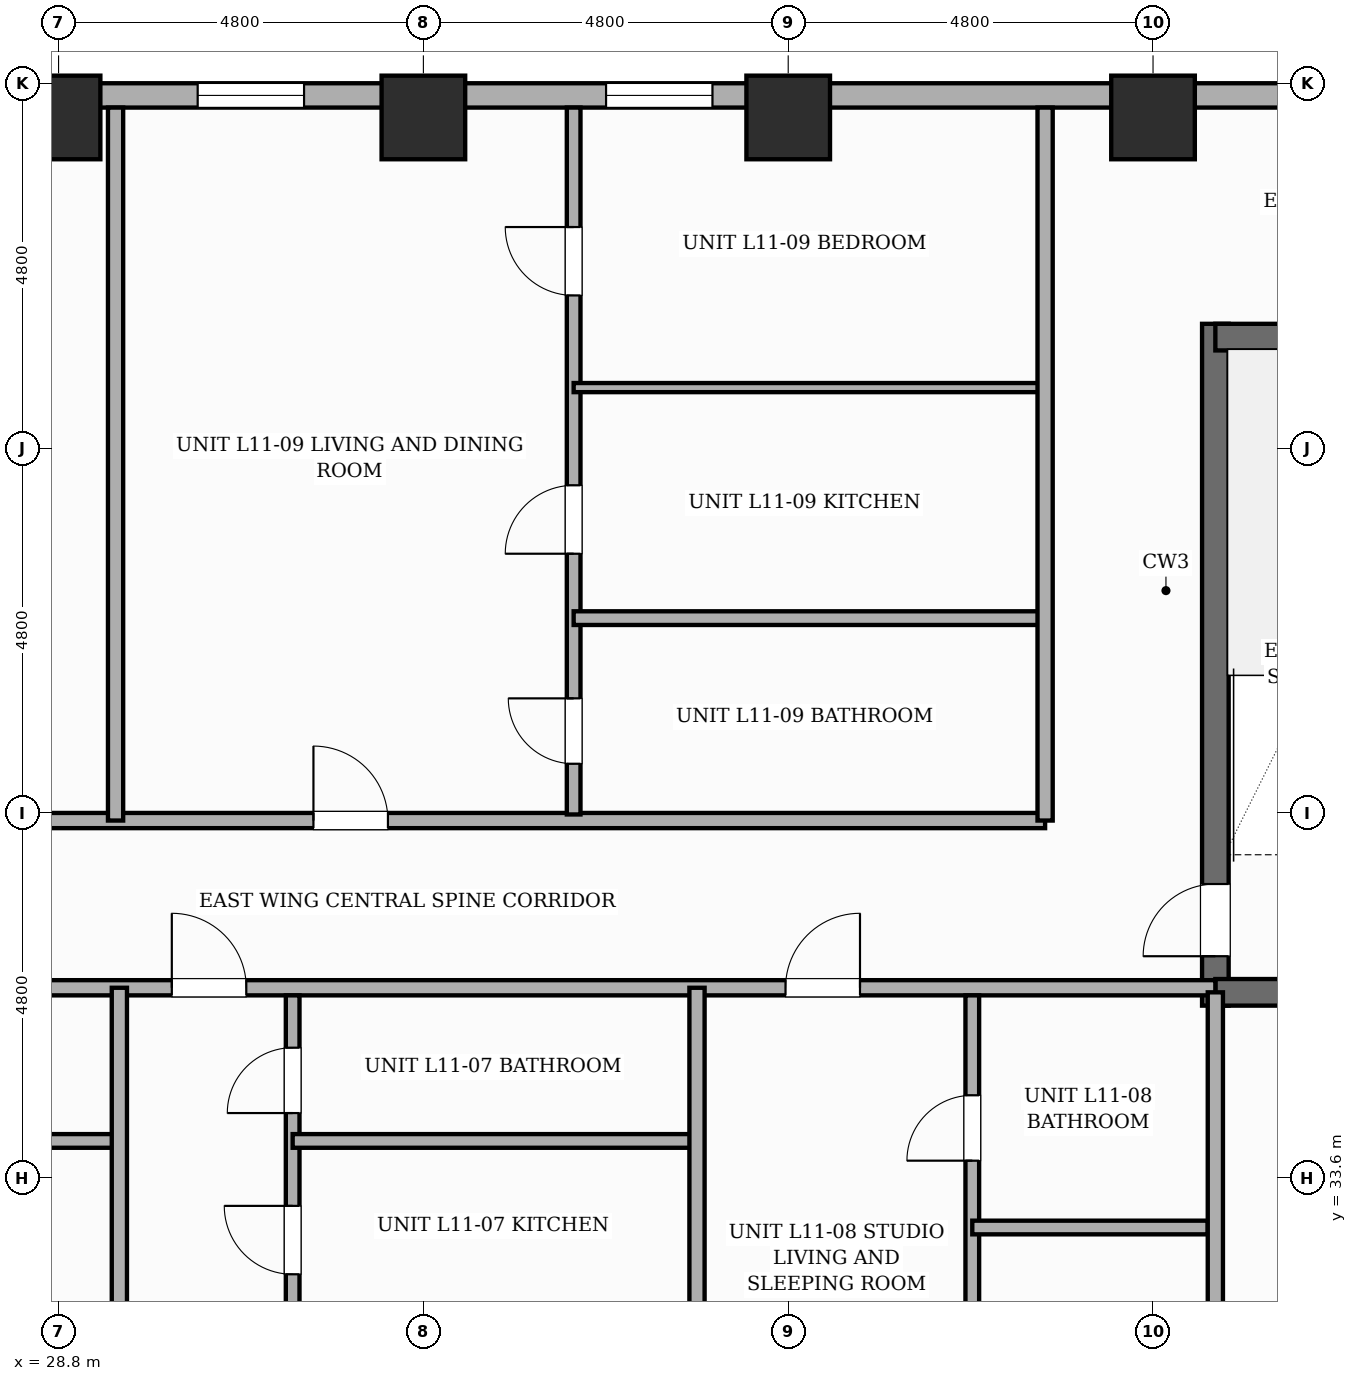
"""IFC4 building model, lengths in metres.
Left out: names, types, materials, properties, quantities, classifications, styles, units other than length and angle.
Written with IfcOpenShell. Run it as: python <this file> out.ifc"""

import sys

from ifc_helpers import new_model, si_unit, direction, frame, frame_2d, origin, origin_2d, place, context, subcontext, project, spatial, rectangle, extrude, element, fill, save


model = new_model("IFC4")
c1 = context("Model", 3, precision=1e-05, world=origin(), true_north=direction((0.0, 1.0)))
c2 = subcontext(c1, "Body", "Model", "MODEL_VIEW")
j1 = project(units=[si_unit("LENGTHUNIT", "METRE"), si_unit("PLANEANGLEUNIT", "RADIAN")], contexts=[c1])
p1 = place(None, origin())
s1 = spatial("IfcSite", under=j1, at=p1, CompositionType="ELEMENT")
p2 = place(p1, origin())
s2 = spatial("IfcBuilding", under=s1, at=p2, CompositionType="ELEMENT")
p3 = place(p2, frame((0.0, 0.0, 46.6)))
s3 = spatial("IfcBuildingStorey", under=s2, at=p3, CompositionType="ELEMENT", Elevation=46.6)
p4 = place(p3, frame((44.02, 35.865, 0.0), z_axis=(0.0, 0.0, 1.0), x_axis=(0.0, 1.0, 0.0)))
e1 = element("IfcWall", 1, at=p4, inside=s3, PredefinedType="SHEAR", context=c2, shape_type="SweptSolid", body=[
    extrude(rectangle(XDim=8.97, YDim=0.35, at=frame_2d((4.485, 0.0))), origin(), (0.0, 0.0, 1.0), 3.6),
])
p5 = place(p4, frame((0.65, 0.0, 0.0)))
e2 = element("IfcOpeningElement", 2, at=p5, cuts=e1, PredefinedType="OPENING", context=c2, shape_type="SweptSolid", body=[
    extrude(rectangle(XDim=0.95, YDim=2.1, at=frame_2d((0.475, 1.05))), frame((0.0, 0.185, 0.0), z_axis=(0.0, -1.0, 0.0), x_axis=(1.0, 0.0, 0.0)), (0.0, 0.0, 1.0), 0.37),
])
for number, where, z_axis, x_axis in (
    (3, (44.02, 36.04, 0.0), (0.0, 0.0, 1.0), (1.0, 0.0, 0.0)),
    (4, (44.02, 44.66, 0.0), (0.0, 0.0, 1.0), (1.0, 0.0, 0.0)),
):
    element("IfcWall", number, at=place(p3, frame(where, z_axis=z_axis, x_axis=x_axis)), inside=s3, PredefinedType="SHEAR", context=c2, shape_type="SweptSolid", body=[
        extrude(rectangle(XDim=3.58, YDim=0.35, at=frame_2d((1.79, 0.0))), origin(), (0.0, 0.0, 1.0), 3.6),
    ])
for number, where, z_axis, x_axis in (
    (5, (28.8, 47.55, 0.0), (0.0, 0.0, 1.0), (1.0, 0.0, 0.0)),
    (6, (33.6, 47.55, 0.0), (0.0, 0.0, 1.0), (1.0, 0.0, 0.0)),
    (7, (38.4, 47.55, 0.0), (0.0, 0.0, 1.0), (1.0, 0.0, 0.0)),
    (8, (43.2, 47.55, 0.0), (0.0, 0.0, 1.0), (1.0, 0.0, 0.0)),
):
    element("IfcColumn", number, at=place(p3, frame(where, z_axis=z_axis, x_axis=x_axis)), inside=s3, PredefinedType="COLUMN", context=c2, shape_type="SweptSolid", body=[
        extrude(rectangle(XDim=1.1, YDim=1.1, at=origin_2d()), origin(), (0.0, 0.0, 1.0), 3.6),
    ])
p6 = place(p3, frame((7.2, 47.84, 0.0), z_axis=(0.0, 0.0, 1.0), x_axis=(1.0, 0.0, 0.0)))
e9 = element("IfcWall", 9, at=p6, inside=s3, PredefinedType="STANDARD", context=c2, shape_type="SweptSolid", body=[
    extrude(rectangle(XDim=48.0, YDim=0.32, at=frame_2d((24.0, 0.0))), origin(), (0.0, 0.0, 1.0), 2.53),
])
p7 = place(p6, frame((28.803, 0.0, 0.65)))
e10 = element("IfcOpeningElement", 10, at=p7, cuts=e9, PredefinedType="OPENING", context=c2, shape_type="SweptSolid", body=[
    extrude(rectangle(XDim=1.4, YDim=1.1, at=frame_2d((0.7, 0.55))), frame((0.0, 0.17, 0.0), z_axis=(0.0, -1.0, 0.0), x_axis=(1.0, 0.0, 0.0)), (0.0, 0.0, 1.0), 0.34),
])
p8 = place(p6, frame((47.094, 0.0, 0.45)))
e11 = element("IfcOpeningElement", 11, at=p8, cuts=e9, PredefinedType="OPENING", context=c2, shape_type="SweptSolid", body=[
    extrude(rectangle(XDim=0.6, YDim=1.8, at=frame_2d((0.3, 0.9))), frame((0.0, 0.17, 0.0), z_axis=(0.0, -1.0, 0.0), x_axis=(1.0, 0.0, 0.0)), (0.0, 0.0, 1.0), 0.34),
])
p9 = place(p6, frame((18.74, 0.0, 0.45)))
e12 = element("IfcOpeningElement", 12, at=p9, cuts=e9, PredefinedType="OPENING", context=c2, shape_type="SweptSolid", body=[
    extrude(rectangle(XDim=0.95, YDim=1.8, at=frame_2d((0.475, 0.9))), frame((0.0, 0.17, 0.0), z_axis=(0.0, -1.0, 0.0), x_axis=(1.0, 0.0, 0.0)), (0.0, 0.0, 1.0), 0.34),
])
p10 = place(p6, frame((41.65, 0.0, 0.45)))
e13 = element("IfcOpeningElement", 13, at=p10, cuts=e9, PredefinedType="OPENING", context=c2, shape_type="SweptSolid", body=[
    extrude(rectangle(XDim=0.75, YDim=1.8, at=frame_2d((0.375, 0.9))), frame((0.0, 0.17, 0.0), z_axis=(0.0, -1.0, 0.0), x_axis=(1.0, 0.0, 0.0)), (0.0, 0.0, 1.0), 0.34),
])
p11 = place(p6, frame((37.736, 0.0, 0.65)))
e14 = element("IfcOpeningElement", 14, at=p11, cuts=e9, PredefinedType="OPENING", context=c2, shape_type="SweptSolid", body=[
    extrude(rectangle(XDim=1.4, YDim=1.1, at=frame_2d((0.7, 0.55))), frame((0.0, 0.17, 0.0), z_axis=(0.0, -1.0, 0.0), x_axis=(1.0, 0.0, 0.0)), (0.0, 0.0, 1.0), 0.34),
])
p12 = place(p6, frame((0.47, 0.0, 0.45)))
e15 = element("IfcOpeningElement", 15, at=p12, cuts=e9, PredefinedType="OPENING", context=c2, shape_type="SweptSolid", body=[
    extrude(rectangle(XDim=0.95, YDim=1.8, at=frame_2d((0.475, 0.9))), frame((0.0, 0.17, 0.0), z_axis=(0.0, -1.0, 0.0), x_axis=(1.0, 0.0, 0.0)), (0.0, 0.0, 1.0), 0.34),
])
p13 = place(p6, frame((10.215, 0.0, 0.45)))
e16 = element("IfcOpeningElement", 16, at=p13, cuts=e9, PredefinedType="OPENING", context=c2, shape_type="SweptSolid", body=[
    extrude(rectangle(XDim=0.95, YDim=1.8, at=frame_2d((0.475, 0.9))), frame((0.0, 0.17, 0.0), z_axis=(0.0, -1.0, 0.0), x_axis=(1.0, 0.0, 0.0)), (0.0, 0.0, 1.0), 0.34),
])
p14 = place(p6, frame((23.43, 0.0, 0.65)))
e17 = element("IfcOpeningElement", 17, at=p14, cuts=e9, PredefinedType="OPENING", context=c2, shape_type="SweptSolid", body=[
    extrude(rectangle(XDim=1.4, YDim=1.1, at=frame_2d((0.7, 0.55))), frame((0.0, 0.17, 0.0), z_axis=(0.0, -1.0, 0.0), x_axis=(1.0, 0.0, 0.0)), (0.0, 0.0, 1.0), 0.34),
])
p15 = place(p6, frame((42.95, 0.0, 0.65)))
e18 = element("IfcOpeningElement", 18, at=p15, cuts=e9, PredefinedType="OPENING", context=c2, shape_type="SweptSolid", body=[
    extrude(rectangle(XDim=1.4, YDim=1.1, at=frame_2d((0.7, 0.55))), frame((0.0, 0.17, 0.0), z_axis=(0.0, -1.0, 0.0), x_axis=(1.0, 0.0, 0.0)), (0.0, 0.0, 1.0), 0.34),
])
p16 = place(p6, frame((45.984, 0.0, 0.45)))
e19 = element("IfcOpeningElement", 19, at=p16, cuts=e9, PredefinedType="OPENING", context=c2, shape_type="SweptSolid", body=[
    extrude(rectangle(XDim=0.6, YDim=1.8, at=frame_2d((0.3, 0.9))), frame((0.0, 0.17, 0.0), z_axis=(0.0, -1.0, 0.0), x_axis=(1.0, 0.0, 0.0)), (0.0, 0.0, 1.0), 0.34),
])
p17 = place(p3, frame((22.75, 36.1, 0.0), z_axis=(0.0, 0.0, 1.0), x_axis=(1.0, 0.0, 0.0)))
e20 = element("IfcWall", 20, at=p17, inside=s3, PredefinedType="PARTITIONING", context=c2, shape_type="SweptSolid", body=[
    extrude(rectangle(XDim=21.27, YDim=0.2, at=frame_2d((10.635, 0.0))), origin(), (0.0, 0.0, 1.0), 3.35),
])
p18 = place(p17, frame((1.271, 0.0, 0.0)))
e21 = element("IfcOpeningElement", 21, at=p18, cuts=e20, PredefinedType="OPENING", context=c2, shape_type="SweptSolid", body=[
    extrude(rectangle(XDim=0.98, YDim=2.18, at=frame_2d((0.49, 1.09))), frame((0.0, 0.11, 0.0), z_axis=(0.0, -1.0, 0.0), x_axis=(1.0, 0.0, 0.0)), (0.0, 0.0, 1.0), 0.22),
])
p19 = place(p17, frame((7.54, 0.0, 0.0)))
e22 = element("IfcOpeningElement", 22, at=p19, cuts=e20, PredefinedType="OPENING", context=c2, shape_type="SweptSolid", body=[
    extrude(rectangle(XDim=0.98, YDim=2.18, at=frame_2d((0.49, 1.09))), frame((0.0, 0.11, 0.0), z_axis=(0.0, -1.0, 0.0), x_axis=(1.0, 0.0, 0.0)), (0.0, 0.0, 1.0), 0.22),
])
p20 = place(p17, frame((15.615, 0.0, 0.0)))
e23 = element("IfcOpeningElement", 23, at=p20, cuts=e20, PredefinedType="OPENING", context=c2, shape_type="SweptSolid", body=[
    extrude(rectangle(XDim=0.98, YDim=2.18, at=frame_2d((0.49, 1.09))), frame((0.0, 0.11, 0.0), z_axis=(0.0, -1.0, 0.0), x_axis=(1.0, 0.0, 0.0)), (0.0, 0.0, 1.0), 0.22),
])
p21 = place(p3, frame((27.35, 38.3, 0.0), z_axis=(0.0, 0.0, 1.0), x_axis=(1.0, 0.0, 0.0)))
e24 = element("IfcWall", 24, at=p21, inside=s3, PredefinedType="PARTITIONING", context=c2, shape_type="SweptSolid", body=[
    extrude(rectangle(XDim=14.43, YDim=0.2, at=frame_2d((7.215, 0.0))), origin(), (0.0, 0.0, 1.0), 3.35),
])
p22 = place(p21, frame((4.803, 0.0, 0.0)))
e25 = element("IfcOpeningElement", 25, at=p22, cuts=e24, PredefinedType="OPENING", context=c2, shape_type="SweptSolid", body=[
    extrude(rectangle(XDim=0.98, YDim=2.18, at=frame_2d((0.49, 1.09))), frame((0.0, 0.11, 0.0), z_axis=(0.0, -1.0, 0.0), x_axis=(1.0, 0.0, 0.0)), (0.0, 0.0, 1.0), 0.22),
])
p23 = place(p3, frame((29.55, 38.3, 0.0), z_axis=(0.0, 0.0, 1.0), x_axis=(0.0, 1.0, 0.0)))
e26 = element("IfcWall", 26, at=p23, inside=s3, PredefinedType="SOLIDWALL", context=c2, shape_type="SweptSolid", body=[
    extrude(rectangle(XDim=9.38, YDim=0.2, at=frame_2d((4.69, 0.0))), origin(), (0.0, 0.0, 1.0), 3.35),
])
p24 = place(p3, frame((26.093, 34.085, 0.0), z_axis=(0.0, 0.0, 1.0), x_axis=(1.0, 0.0, 0.0)))
e27 = element("IfcWall", 27, at=p24, inside=s3, PredefinedType="PLUMBINGWALL", context=c2, shape_type="SweptSolid", body=[
    extrude(rectangle(XDim=3.507, YDim=0.18, at=frame_2d((1.753, 0.0))), origin(), (0.0, 0.0, 1.0), 3.35),
])
p25 = place(p3, frame((29.6, 29.12, 0.0), z_axis=(0.0, 0.0, 1.0), x_axis=(0.0, 1.0, 0.0)))
e28 = element("IfcWall", 28, at=p25, inside=s3, PredefinedType="SOLIDWALL", context=c2, shape_type="SweptSolid", body=[
    extrude(rectangle(XDim=6.98, YDim=0.2, at=frame_2d((3.49, 0.0))), origin(), (0.0, 0.0, 1.0), 3.35),
])
p26 = place(p3, frame((31.88, 29.12, 0.0), z_axis=(0.0, 0.0, 1.0), x_axis=(0.0, 1.0, 0.0)))
e29 = element("IfcWall", 29, at=p26, inside=s3, PredefinedType="PLUMBINGWALL", context=c2, shape_type="SweptSolid", body=[
    extrude(rectangle(XDim=6.88, YDim=0.18, at=frame_2d((3.44, 0.0))), origin(), (0.0, 0.0, 1.0), 3.35),
])
p27 = place(p26, frame((0.917, 0.0, 0.0)))
e30 = element("IfcOpeningElement", 30, at=p27, cuts=e29, PredefinedType="OPENING", context=c2, shape_type="SweptSolid", body=[
    extrude(rectangle(XDim=0.9, YDim=2.15, at=frame_2d((0.45, 1.075))), frame((0.0, 0.1, 0.0), z_axis=(0.0, -1.0, 0.0), x_axis=(1.0, 0.0, 0.0)), (0.0, 0.0, 1.0), 0.2),
])
p28 = place(p26, frame((3.21, 0.0, 0.0)))
e31 = element("IfcOpeningElement", 31, at=p28, cuts=e29, PredefinedType="OPENING", context=c2, shape_type="SweptSolid", body=[
    extrude(rectangle(XDim=0.9, YDim=2.15, at=frame_2d((0.45, 1.075))), frame((0.0, 0.1, 0.0), z_axis=(0.0, -1.0, 0.0), x_axis=(1.0, 0.0, 0.0)), (0.0, 0.0, 1.0), 0.2),
])
p29 = place(p26, frame((5.332, 0.0, 0.0)))
e32 = element("IfcOpeningElement", 32, at=p29, cuts=e29, PredefinedType="OPENING", context=c2, shape_type="SweptSolid", body=[
    extrude(rectangle(XDim=0.86, YDim=2.1, at=frame_2d((0.43, 1.05))), frame((0.0, 0.1, 0.0), z_axis=(0.0, -1.0, 0.0), x_axis=(1.0, 0.0, 0.0)), (0.0, 0.0, 1.0), 0.2),
])
p30 = place(p3, frame((31.88, 34.085, 0.0), z_axis=(0.0, 0.0, 1.0), x_axis=(1.0, 0.0, 0.0)))
e33 = element("IfcWall", 33, at=p30, inside=s3, PredefinedType="PLUMBINGWALL", context=c2, shape_type="SweptSolid", body=[
    extrude(rectangle(XDim=5.32, YDim=0.18, at=frame_2d((2.66, 0.0))), origin(), (0.0, 0.0, 1.0), 3.35),
])
p31 = place(p3, frame((37.2, 29.12, 0.0), z_axis=(0.0, 0.0, 1.0), x_axis=(0.0, 1.0, 0.0)))
e34 = element("IfcWall", 34, at=p31, inside=s3, PredefinedType="SOLIDWALL", context=c2, shape_type="SweptSolid", body=[
    extrude(rectangle(XDim=6.98, YDim=0.2, at=frame_2d((3.49, 0.0))), origin(), (0.0, 0.0, 1.0), 3.35),
])
p32 = place(p3, frame((40.822, 29.12, 0.0), z_axis=(0.0, 0.0, 1.0), x_axis=(0.0, 1.0, 0.0)))
e35 = element("IfcWall", 35, at=p32, inside=s3, PredefinedType="PLUMBINGWALL", context=c2, shape_type="SweptSolid", body=[
    extrude(rectangle(XDim=6.88, YDim=0.18, at=frame_2d((3.44, 0.0))), origin(), (0.0, 0.0, 1.0), 3.35),
])
p33 = place(p32, frame((1.116, 0.0, 0.0)))
e36 = element("IfcOpeningElement", 36, at=p33, cuts=e35, PredefinedType="OPENING", context=c2, shape_type="SweptSolid", body=[
    extrude(rectangle(XDim=0.9, YDim=2.15, at=frame_2d((0.45, 1.075))), frame((0.0, 0.1, 0.0), z_axis=(0.0, -1.0, 0.0), x_axis=(1.0, 0.0, 0.0)), (0.0, 0.0, 1.0), 0.2),
])
p34 = place(p32, frame((4.705, 0.0, 0.0)))
e37 = element("IfcOpeningElement", 37, at=p34, cuts=e35, PredefinedType="OPENING", context=c2, shape_type="SweptSolid", body=[
    extrude(rectangle(XDim=0.86, YDim=2.1, at=frame_2d((0.43, 1.05))), frame((0.0, 0.1, 0.0), z_axis=(0.0, -1.0, 0.0), x_axis=(1.0, 0.0, 0.0)), (0.0, 0.0, 1.0), 0.2),
])
p35 = place(p3, frame((40.822, 32.946, 0.0), z_axis=(0.0, 0.0, 1.0), x_axis=(1.0, 0.0, 0.0)))
e38 = element("IfcWall", 38, at=p35, inside=s3, PredefinedType="PLUMBINGWALL", context=c2, shape_type="SweptSolid", body=[
    extrude(rectangle(XDim=3.098, YDim=0.18, at=frame_2d((1.549, 0.0))), origin(), (0.0, 0.0, 1.0), 3.35),
])
p36 = place(p3, frame((35.577, 38.38, 0.0), z_axis=(0.0, 0.0, 1.0), x_axis=(0.0, 1.0, 0.0)))
e39 = element("IfcWall", 39, at=p36, inside=s3, PredefinedType="PLUMBINGWALL", context=c2, shape_type="SweptSolid", body=[
    extrude(rectangle(XDim=9.3, YDim=0.18, at=frame_2d((4.65, 0.0))), origin(), (0.0, 0.0, 1.0), 3.35),
])
p37 = place(p36, frame((0.667, 0.0, 0.0)))
e40 = element("IfcOpeningElement", 40, at=p37, cuts=e39, PredefinedType="OPENING", context=c2, shape_type="SweptSolid", body=[
    extrude(rectangle(XDim=0.86, YDim=2.1, at=frame_2d((0.43, 1.05))), frame((0.0, 0.1, 0.0), z_axis=(0.0, -1.0, 0.0), x_axis=(1.0, 0.0, 0.0)), (0.0, 0.0, 1.0), 0.2),
])
p38 = place(p36, frame((3.43, 0.0, 0.0)))
e41 = element("IfcOpeningElement", 41, at=p38, cuts=e39, PredefinedType="OPENING", context=c2, shape_type="SweptSolid", body=[
    extrude(rectangle(XDim=0.9, YDim=2.15, at=frame_2d((0.45, 1.075))), frame((0.0, 0.1, 0.0), z_axis=(0.0, -1.0, 0.0), x_axis=(1.0, 0.0, 0.0)), (0.0, 0.0, 1.0), 0.2),
])
p39 = place(p36, frame((6.828, 0.0, 0.0)))
e42 = element("IfcOpeningElement", 42, at=p39, cuts=e39, PredefinedType="OPENING", context=c2, shape_type="SweptSolid", body=[
    extrude(rectangle(XDim=0.9, YDim=2.15, at=frame_2d((0.45, 1.075))), frame((0.0, 0.1, 0.0), z_axis=(0.0, -1.0, 0.0), x_axis=(1.0, 0.0, 0.0)), (0.0, 0.0, 1.0), 0.2),
])
p40 = place(p3, frame((35.577, 40.963, 0.0), z_axis=(0.0, 0.0, 1.0), x_axis=(1.0, 0.0, 0.0)))
e43 = element("IfcWall", 43, at=p40, inside=s3, PredefinedType="PLUMBINGWALL", context=c2, shape_type="SweptSolid", body=[
    extrude(rectangle(XDim=6.123, YDim=0.18, at=frame_2d((3.062, 0.0))), origin(), (0.0, 0.0, 1.0), 3.35),
])
p41 = place(p3, frame((35.577, 43.996, 0.0), z_axis=(0.0, 0.0, 1.0), x_axis=(1.0, 0.0, 0.0)))
e44 = element("IfcWall", 44, at=p41, inside=s3, PredefinedType="PARTITIONING", context=c2, shape_type="SweptSolid", body=[
    extrude(rectangle(XDim=6.123, YDim=0.12, at=frame_2d((3.062, 0.0))), origin(), (0.0, 0.0, 1.0), 3.35),
])
p42 = place(p3, frame((41.78, 38.3, 0.0), z_axis=(0.0, 0.0, 1.0), x_axis=(0.0, 1.0, 0.0)))
e45 = element("IfcWall", 45, at=p42, inside=s3, PredefinedType="PARTITIONING", context=c2, shape_type="SweptSolid", body=[
    extrude(rectangle(XDim=9.38, YDim=0.2, at=frame_2d((4.69, 0.0))), origin(), (0.0, 0.0, 1.0), 3.35),
])
p43 = place(p3, frame((44.02, 29.12, 0.0), z_axis=(0.0, 0.0, 1.0), x_axis=(0.0, 1.0, 0.0)))
e46 = element("IfcWall", 46, at=p43, inside=s3, PredefinedType="SOLIDWALL", context=c2, shape_type="SweptSolid", body=[
    extrude(rectangle(XDim=6.92, YDim=0.2, at=frame_2d((3.46, 0.0))), origin(), (0.0, 0.0, 1.0), 3.35),
])
p44 = place(p7, origin())
e47 = element("IfcWindow", 47, at=p44, inside=s3, PartitioningType="SINGLE_PANEL", PredefinedType="WINDOW", context=c2, shape_type="SweptSolid", body=[
    extrude(rectangle(XDim=1.4, YDim=1.1, at=frame_2d((0.7, 0.55))), frame((0.0, 0.03, 0.0), z_axis=(0.0, -1.0, 0.0), x_axis=(1.0, 0.0, 0.0)), (0.0, 0.0, 1.0), 0.06),
])
fill(e10, e47)
p45 = place(p14, origin())
e48 = element("IfcWindow", 48, at=p45, inside=s3, PartitioningType="SINGLE_PANEL", PredefinedType="WINDOW", context=c2, shape_type="SweptSolid", body=[
    extrude(rectangle(XDim=1.4, YDim=1.1, at=frame_2d((0.7, 0.55))), frame((0.0, 0.03, 0.0), z_axis=(0.0, -1.0, 0.0), x_axis=(1.0, 0.0, 0.0)), (0.0, 0.0, 1.0), 0.06),
])
fill(e17, e48)
p46 = place(p5, origin())
e49 = element("IfcDoor", 49, at=p46, inside=s3, OperationType="SINGLE_SWING_LEFT", PredefinedType="DOOR", context=c2, shape_type="SweptSolid", body=[
    extrude(rectangle(XDim=0.95, YDim=2.1, at=frame_2d((0.475, 1.05))), frame((0.0, 0.025, 0.0), z_axis=(0.0, -1.0, 0.0), x_axis=(1.0, 0.0, 0.0)), (0.0, 0.0, 1.0), 0.05),
])
fill(e2, e49)
p47 = place(p19, origin())
e50 = element("IfcDoor", 50, at=p47, inside=s3, OperationType="SINGLE_SWING_LEFT", PredefinedType="DOOR", context=c2, shape_type="SweptSolid", body=[
    extrude(rectangle(XDim=0.98, YDim=2.18, at=frame_2d((0.49, 1.09))), frame((0.0, 0.025, 0.0), z_axis=(0.0, -1.0, 0.0), x_axis=(1.0, 0.0, 0.0)), (0.0, 0.0, 1.0), 0.05),
])
fill(e22, e50)
p48 = place(p28, origin())
e51 = element("IfcDoor", 51, at=p48, inside=s3, OperationType="SINGLE_SWING_RIGHT", PredefinedType="DOOR", context=c2, shape_type="SweptSolid", body=[
    extrude(rectangle(XDim=0.9, YDim=2.15, at=frame_2d((0.45, 1.075))), frame((0.0, 0.025, 0.0), z_axis=(0.0, -1.0, 0.0), x_axis=(1.0, 0.0, 0.0)), (0.0, 0.0, 1.0), 0.05),
])
fill(e31, e51)
p49 = place(p29, origin())
e52 = element("IfcDoor", 52, at=p49, inside=s3, OperationType="SINGLE_SWING_LEFT", PredefinedType="DOOR", context=c2, shape_type="SweptSolid", body=[
    extrude(rectangle(XDim=0.86, YDim=2.1, at=frame_2d((0.43, 1.05))), frame((0.0, 0.025, 0.0), z_axis=(0.0, -1.0, 0.0), x_axis=(1.0, 0.0, 0.0)), (0.0, 0.0, 1.0), 0.05),
])
fill(e32, e52)
p50 = place(p20, origin())
e53 = element("IfcDoor", 53, at=p50, inside=s3, OperationType="SINGLE_SWING_RIGHT", PredefinedType="DOOR", context=c2, shape_type="SweptSolid", body=[
    extrude(rectangle(XDim=0.98, YDim=2.18, at=frame_2d((0.49, 1.09))), frame((0.0, 0.025, 0.0), z_axis=(0.0, -1.0, 0.0), x_axis=(1.0, 0.0, 0.0)), (0.0, 0.0, 1.0), 0.05),
])
fill(e23, e53)
p51 = place(p34, origin())
e54 = element("IfcDoor", 54, at=p51, inside=s3, OperationType="SINGLE_SWING_LEFT", PredefinedType="DOOR", context=c2, shape_type="SweptSolid", body=[
    extrude(rectangle(XDim=0.86, YDim=2.1, at=frame_2d((0.43, 1.05))), frame((0.0, 0.025, 0.0), z_axis=(0.0, -1.0, 0.0), x_axis=(1.0, 0.0, 0.0)), (0.0, 0.0, 1.0), 0.05),
])
fill(e37, e54)
p52 = place(p22, origin())
e55 = element("IfcDoor", 55, at=p52, inside=s3, OperationType="SINGLE_SWING_LEFT", PredefinedType="DOOR", context=c2, shape_type="SweptSolid", body=[
    extrude(rectangle(XDim=0.98, YDim=2.18, at=frame_2d((0.49, 1.09))), frame((0.0, 0.025, 0.0), z_axis=(0.0, -1.0, 0.0), x_axis=(1.0, 0.0, 0.0)), (0.0, 0.0, 1.0), 0.05),
])
fill(e25, e55)
p53 = place(p37, origin())
e56 = element("IfcDoor", 56, at=p53, inside=s3, OperationType="SINGLE_SWING_RIGHT", PredefinedType="DOOR", context=c2, shape_type="SweptSolid", body=[
    extrude(rectangle(XDim=0.86, YDim=2.1, at=frame_2d((0.43, 1.05))), frame((0.0, 0.025, 0.0), z_axis=(0.0, -1.0, 0.0), x_axis=(1.0, 0.0, 0.0)), (0.0, 0.0, 1.0), 0.05),
])
fill(e40, e56)
p54 = place(p38, origin())
e57 = element("IfcDoor", 57, at=p54, inside=s3, OperationType="SINGLE_SWING_LEFT", PredefinedType="DOOR", context=c2, shape_type="SweptSolid", body=[
    extrude(rectangle(XDim=0.9, YDim=2.15, at=frame_2d((0.45, 1.075))), frame((0.0, 0.025, 0.0), z_axis=(0.0, -1.0, 0.0), x_axis=(1.0, 0.0, 0.0)), (0.0, 0.0, 1.0), 0.05),
])
fill(e41, e57)
p55 = place(p39, origin())
e58 = element("IfcDoor", 58, at=p55, inside=s3, OperationType="SINGLE_SWING_RIGHT", PredefinedType="DOOR", context=c2, shape_type="SweptSolid", body=[
    extrude(rectangle(XDim=0.9, YDim=2.15, at=frame_2d((0.45, 1.075))), frame((0.0, 0.025, 0.0), z_axis=(0.0, -1.0, 0.0), x_axis=(1.0, 0.0, 0.0)), (0.0, 0.0, 1.0), 0.05),
])
fill(e42, e58)
save(model, sys.argv[1])
